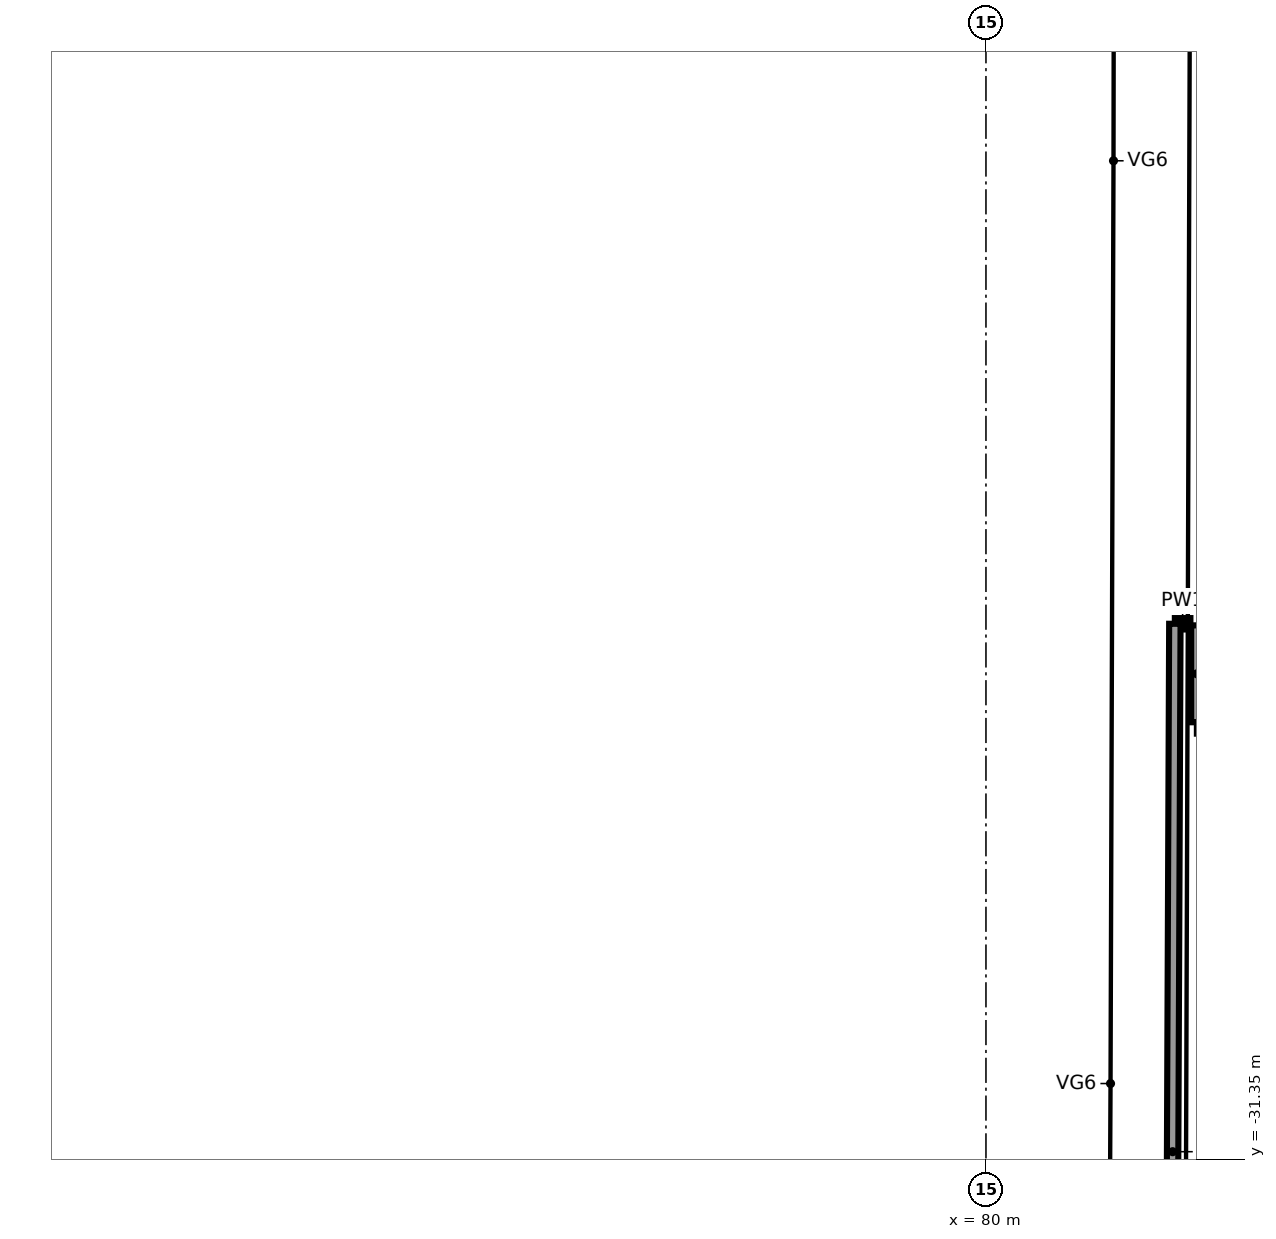
"""IFC4 building model, lengths in metres.
Left out: names, types, materials, properties, quantities, classifications, styles, units other than length and angle.
Written with IfcOpenShell. Run it as: python <this file> out.ifc"""

import sys

from ifc_helpers import new_model, si_unit, direction, frame, frame_2d, origin, place, context, subcontext, project, spatial, rectangle, extrude, element, save


model = new_model("IFC4")
c1 = context("Model", 3, precision=1e-05, world=origin(), true_north=direction((0.0, 1.0)))
c2 = subcontext(c1, "Body", "Model", "MODEL_VIEW")
j1 = project(units=[si_unit("LENGTHUNIT", "METRE"), si_unit("PLANEANGLEUNIT", "RADIAN")], contexts=[c1])
p1 = place(None, origin())
s1 = spatial("IfcSite", under=j1, at=p1, CompositionType="ELEMENT")
p2 = place(p1, origin())
s2 = spatial("IfcBuilding", under=s1, at=p2, CompositionType="ELEMENT")
p3 = place(p2, frame((0.0, 0.0, 24.0)))
s3 = spatial("IfcBuildingStorey", under=s2, at=p3, CompositionType="ELEMENT", Elevation=24.0)
for number, where, z_axis, x_axis in (
    (1, (82.775, -24.325, 0.0), (0.0, 0.0, 1.0), (0.0, -1.0, 0.0)),
    (2, (82.775, -25.675, 0.0), (0.0, 0.0, 1.0), (1.0, 0.0, 0.0)),
):
    element("IfcWall", number, at=place(p3, frame(where, z_axis=z_axis, x_axis=x_axis)), inside=s3, PredefinedType="PARTITIONING", context=c2, shape_type="SweptSolid", body=[
        extrude(rectangle(XDim=1.275, YDim=0.15, at=frame_2d((0.638, 0.0))), origin(), (0.0, 0.0, 1.0), 5.4),
    ])
p4 = place(p3, frame((82.69, -24.304, 0.0), z_axis=(0.0, 0.0, 1.0), x_axis=(-1.0, 0.0, 0.0)))
e3 = element("IfcWall", 3, at=p4, inside=s3, PredefinedType="PARTITIONING", context=c2, shape_type="SweptSolid", body=[
    extrude(rectangle(XDim=0.205, YDim=0.15, at=frame_2d((0.103, 0.0))), origin(), (0.0, 0.0, 1.0), 5.4),
])
p5 = place(p3, frame((82.485, -24.304, 0.0), z_axis=(0.0, 0.0, 1.0), x_axis=(-0.004200609734, -0.9999911774, 0.0)))
e4 = element("IfcWall", 4, at=p5, inside=s3, PredefinedType="PARTITIONING", context=c2, shape_type="SweptSolid", body=[
    extrude(rectangle(XDim=13.891, YDim=0.15, at=frame_2d((6.945, 0.0))), origin(), (0.0, 0.0, 1.0), 5.4),
])
save(model, sys.argv[1])
